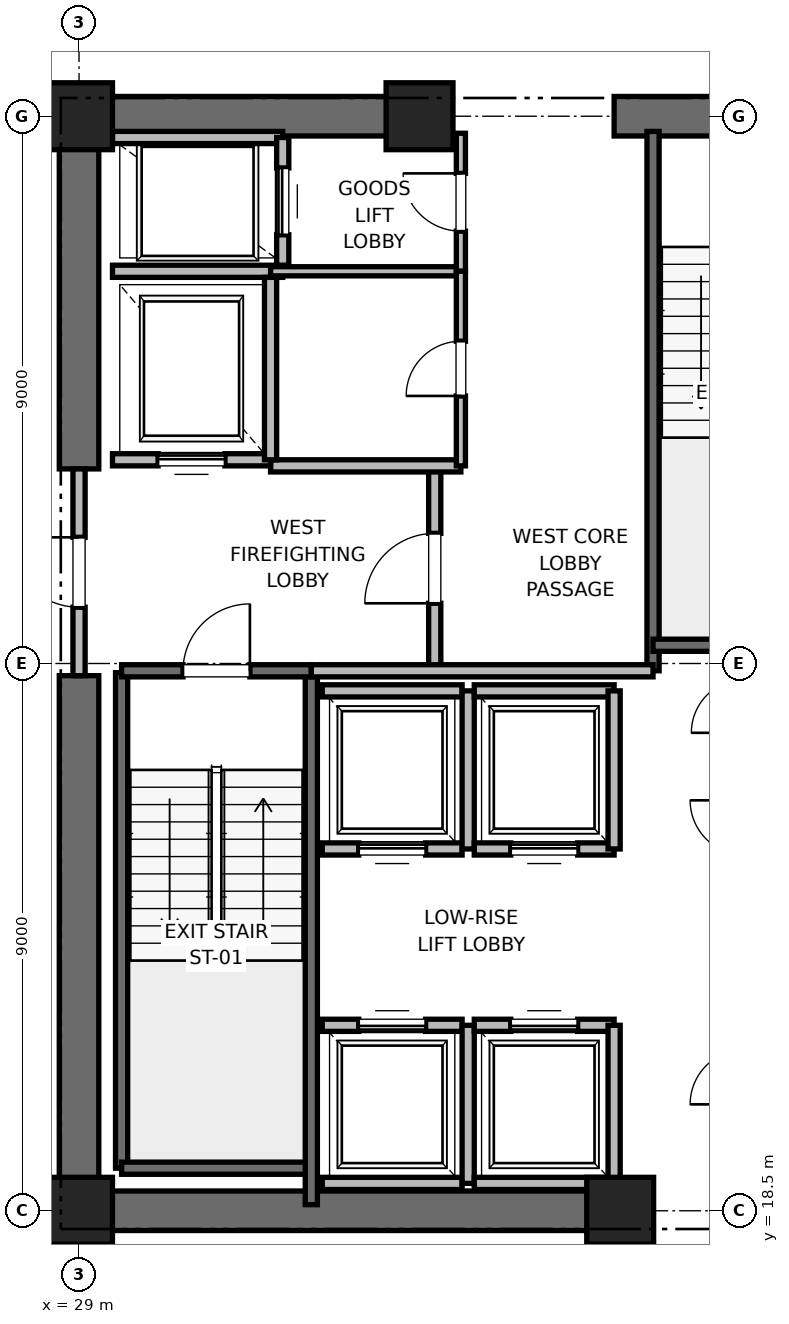
"""IFC4 building model, lengths in metres.
Left out: names, types, materials, properties, quantities, classifications, styles, units other than length and angle.
Written with IfcOpenShell. Run it as: python <this file> out.ifc"""

import sys

from ifc_helpers import new_model, si_unit, direction, frame, frame_2d, origin, origin_2d, place, context, subcontext, project, spatial, rectangle, extrude, element, fill, save


model = new_model("IFC4")
c1 = context("Model", 3, precision=1e-05, world=origin(), true_north=direction((0.0, 1.0)))
c2 = subcontext(c1, "Body", "Model", "MODEL_VIEW")
j1 = project(units=[si_unit("LENGTHUNIT", "METRE"), si_unit("PLANEANGLEUNIT", "RADIAN")], contexts=[c1])
p1 = place(None, origin())
s1 = spatial("IfcSite", under=j1, at=p1, CompositionType="ELEMENT")
p2 = place(p1, origin())
s2 = spatial("IfcBuilding", under=s1, at=p2, CompositionType="ELEMENT")
p3 = place(p2, frame((0.0, 0.0, 71.6)))
s3 = spatial("IfcBuildingStorey", under=s2, at=p3, CompositionType="ELEMENT", Elevation=71.6)
for number, where, z_axis, x_axis in (
    (1, (29.0, 18.5, 0.0), (0.0, 0.0, 1.0), (1.0, 0.0, 0.0)),
    (2, (29.0, 36.5, 0.0), (0.0, 0.0, 1.0), (1.0, 0.0, 0.0)),
    (3, (37.9, 18.5, 0.0), (0.0, 0.0, 1.0), (1.0, 0.0, 0.0)),
    (4, (34.6, 36.5, 0.0), (0.0, 0.0, 1.0), (1.0, 0.0, 0.0)),
):
    element("IfcColumn", number, at=place(p3, frame(where, z_axis=z_axis, x_axis=x_axis)), inside=s3, PredefinedType="PILASTER", context=c2, shape_type="SweptSolid", body=[
        extrude(rectangle(XDim=1.1, YDim=1.1, at=origin_2d()), origin(), (0.0, 0.0, 1.0), 4.0),
    ])
p4 = place(p3, frame((29.0, 18.5, 0.0), z_axis=(0.0, 0.0, 1.0), x_axis=(1.0, 0.0, 0.0)))
e5 = element("IfcWall", 5, at=p4, inside=s3, PredefinedType="SHEAR", context=c2, shape_type="SweptSolid", body=[
    extrude(rectangle(XDim=9.2, YDim=0.65, at=frame_2d((4.6, 0.0))), origin(), (0.0, 0.0, 1.0), 3.76),
])
p5 = place(p3, frame((29.0, 36.5, 0.0), z_axis=(0.0, 0.0, 1.0), x_axis=(1.0, 0.0, 0.0)))
e6 = element("IfcWall", 6, at=p5, inside=s3, PredefinedType="SHEAR", context=c2, shape_type="SweptSolid", body=[
    extrude(rectangle(XDim=5.8, YDim=0.65, at=frame_2d((2.9, 0.0))), origin(), (0.0, 0.0, 1.0), 3.76),
])
p6 = place(p3, frame((37.8, 36.5, 0.0), z_axis=(0.0, 0.0, 1.0), x_axis=(1.0, 0.0, 0.0)))
e7 = element("IfcWall", 7, at=p6, inside=s3, PredefinedType="SHEAR", context=c2, shape_type="SweptSolid", body=[
    extrude(rectangle(XDim=4.4, YDim=0.65, at=frame_2d((2.2, 0.0))), origin(), (0.0, 0.0, 1.0), 3.76),
])
p7 = place(p6, frame((1.65, 0.0, 0.0)))
e8 = element("IfcOpeningElement", 8, at=p7, cuts=e7, PredefinedType="OPENING", context=c2, shape_type="SweptSolid", body=[
    extrude(rectangle(XDim=1.1, YDim=2.15, at=frame_2d((0.55, 1.075))), frame((0.0, 0.325, 0.0), z_axis=(0.0, -1.0, 0.0), x_axis=(1.0, 0.0, 0.0)), (0.0, 0.0, 1.0), 0.65),
])
p8 = place(p3, frame((29.0, 18.5, 0.0), z_axis=(0.0, 0.0, 1.0), x_axis=(0.0, 1.0, 0.0)))
e9 = element("IfcWall", 9, at=p8, inside=s3, PredefinedType="SHEAR", context=c2, shape_type="SweptSolid", body=[
    extrude(rectangle(XDim=8.8, YDim=0.65, at=frame_2d((4.4, 0.0))), origin(), (0.0, 0.0, 1.0), 3.76),
])
p9 = place(p3, frame((29.0, 30.7, 0.0), z_axis=(0.0, 0.0, 1.0), x_axis=(0.0, 1.0, 0.0)))
e10 = element("IfcWall", 10, at=p9, inside=s3, PredefinedType="SHEAR", context=c2, shape_type="SweptSolid", body=[
    extrude(rectangle(XDim=5.8, YDim=0.65, at=frame_2d((2.9, 0.0))), origin(), (0.0, 0.0, 1.0), 3.76),
])
p10 = place(p3, frame((29.7, 19.2, 0.0), z_axis=(0.0, 0.0, 1.0), x_axis=(0.0, 1.0, 0.0)))
e11 = element("IfcWall", 11, at=p10, inside=s3, PredefinedType="SOLIDWALL", context=c2, shape_type="SweptSolid", body=[
    extrude(rectangle(XDim=8.15, YDim=0.2, at=frame_2d((4.075, 0.0))), origin(), (0.0, 0.0, 1.0), 3.76),
])
p11 = place(p3, frame((29.7, 19.2, 0.0), z_axis=(0.0, 0.0, 1.0), x_axis=(1.0, 0.0, 0.0)))
e12 = element("IfcWall", 12, at=p11, inside=s3, PredefinedType="SOLIDWALL", context=c2, shape_type="SweptSolid", body=[
    extrude(rectangle(XDim=3.12, YDim=0.2, at=frame_2d((1.56, 0.0))), origin(), (0.0, 0.0, 1.0), 3.76),
])
p12 = place(p3, frame((32.82, 18.6, 0.0), z_axis=(0.0, 0.0, 1.0), x_axis=(0.0, 1.0, 0.0)))
e13 = element("IfcWall", 13, at=p12, inside=s3, PredefinedType="SOLIDWALL", context=c2, shape_type="SweptSolid", body=[
    extrude(rectangle(XDim=8.78, YDim=0.2, at=frame_2d((4.39, 0.0))), origin(), (0.0, 0.0, 1.0), 3.76),
])
p13 = place(p3, frame((29.7, 27.38, 0.0), z_axis=(0.0, 0.0, 1.0), x_axis=(1.0, 0.0, 0.0)))
e14 = element("IfcWall", 14, at=p13, inside=s3, PredefinedType="SOLIDWALL", context=c2, shape_type="SweptSolid", body=[
    extrude(rectangle(XDim=3.12, YDim=0.2, at=frame_2d((1.56, 0.0))), origin(), (0.0, 0.0, 1.0), 3.76),
])
p14 = place(p13, frame((1.01, 0.0, 0.0)))
e15 = element("IfcOpeningElement", 15, at=p14, cuts=e14, PredefinedType="OPENING", context=c2, shape_type="SweptSolid", body=[
    extrude(rectangle(XDim=1.1, YDim=2.15, at=frame_2d((0.55, 1.075))), frame((0.0, 0.1, 0.0), z_axis=(0.0, -1.0, 0.0), x_axis=(1.0, 0.0, 0.0)), (0.0, 0.0, 1.0), 0.2),
])
p15 = place(p3, frame((38.44, 27.38, 0.0), z_axis=(0.0, 0.0, 1.0), x_axis=(0.0, 1.0, 0.0)))
e16 = element("IfcWall", 16, at=p15, inside=s3, PredefinedType="SOLIDWALL", context=c2, shape_type="SweptSolid", body=[
    extrude(rectangle(XDim=8.87, YDim=0.2, at=frame_2d((4.435, 0.0))), origin(), (0.0, 0.0, 1.0), 3.76),
])
p16 = place(p3, frame((38.44, 27.8, 0.0), z_axis=(0.0, 0.0, 1.0), x_axis=(1.0, 0.0, 0.0)))
e17 = element("IfcWall", 17, at=p16, inside=s3, PredefinedType="SOLIDWALL", context=c2, shape_type="SweptSolid", body=[
    extrude(rectangle(XDim=3.32, YDim=0.2, at=frame_2d((1.66, 0.0))), origin(), (0.0, 0.0, 1.0), 3.76),
])
p17 = place(p3, frame((34.85, 27.38, 0.0), z_axis=(0.0, 0.0, 1.0), x_axis=(0.0, 1.0, 0.0)))
e18 = element("IfcWall", 18, at=p17, inside=s3, PredefinedType="PARTITIONING", context=c2, shape_type="SweptSolid", body=[
    extrude(rectangle(XDim=3.37, YDim=0.2, at=frame_2d((1.685, 0.0))), origin(), (0.0, 0.0, 1.0), 3.76),
])
p18 = place(p17, frame((1.11, 0.0, 0.0)))
e19 = element("IfcOpeningElement", 19, at=p18, cuts=e18, PredefinedType="OPENING", context=c2, shape_type="SweptSolid", body=[
    extrude(rectangle(XDim=1.15, YDim=2.2, at=frame_2d((0.575, 1.1))), frame((0.0, 0.1, 0.0), z_axis=(0.0, -1.0, 0.0), x_axis=(1.0, 0.0, 0.0)), (0.0, 0.0, 1.0), 0.2),
])
p19 = place(p3, frame((29.0, 27.3, 0.0), z_axis=(0.0, 0.0, 1.0), x_axis=(0.0, 1.0, 0.0)))
e20 = element("IfcWall", 20, at=p19, inside=s3, PredefinedType="PARTITIONING", context=c2, shape_type="SweptSolid", body=[
    extrude(rectangle(XDim=3.4, YDim=0.2, at=frame_2d((1.7, 0.0))), origin(), (0.0, 0.0, 1.0), 2.54),
])
p20 = place(p19, frame((1.125, 0.0, 0.0)))
e21 = element("IfcOpeningElement", 21, at=p20, cuts=e20, PredefinedType="OPENING", context=c2, shape_type="SweptSolid", body=[
    extrude(rectangle(XDim=1.15, YDim=2.2, at=frame_2d((0.575, 1.1))), frame((0.0, 0.1, 0.0), z_axis=(0.0, -1.0, 0.0), x_axis=(1.0, 0.0, 0.0)), (0.0, 0.0, 1.0), 0.2),
])
p21 = place(p3, frame((32.82, 27.38, 0.0), z_axis=(0.0, 0.0, 1.0), x_axis=(1.0, 0.0, 0.0)))
e22 = element("IfcWall", 22, at=p21, inside=s3, PredefinedType="PARTITIONING", context=c2, shape_type="SweptSolid", body=[
    extrude(rectangle(XDim=5.62, YDim=0.2, at=frame_2d((2.81, 0.0))), origin(), (0.0, 0.0, 1.0), 3.76),
])
p22 = place(p3, frame((32.15, 30.75, 0.0), z_axis=(0.0, 0.0, 1.0), x_axis=(1.0, 0.0, 0.0)))
e23 = element("IfcWall", 23, at=p22, inside=s3, PredefinedType="PARTITIONING", context=c2, shape_type="SweptSolid", body=[
    extrude(rectangle(XDim=3.13, YDim=0.2, at=frame_2d((1.565, 0.0))), origin(), (0.0, 0.0, 1.0), 3.76),
])
p23 = place(p3, frame((29.55, 30.85, 0.0), z_axis=(0.0, 0.0, 1.0), x_axis=(1.0, 0.0, 0.0)))
e24 = element("IfcWall", 24, at=p23, inside=s3, PredefinedType="SOLIDWALL", context=c2, shape_type="SweptSolid", body=[
    extrude(rectangle(XDim=2.6, YDim=0.2, at=frame_2d((1.3, 0.0))), origin(), (0.0, 0.0, 1.0), 2.54),
])
p24 = place(p23, frame((0.75, 0.0, 0.0)))
e25 = element("IfcOpeningElement", 25, at=p24, cuts=e24, PredefinedType="OPENING", context=c2, shape_type="SweptSolid", body=[
    extrude(rectangle(XDim=1.1, YDim=2.2, at=frame_2d((0.55, 1.1))), frame((0.0, 0.1, 0.0), z_axis=(0.0, -1.0, 0.0), x_axis=(1.0, 0.0, 0.0)), (0.0, 0.0, 1.0), 0.2),
])
p25 = place(p3, frame((29.55, 33.95, 0.0), z_axis=(0.0, 0.0, 1.0), x_axis=(1.0, 0.0, 0.0)))
e26 = element("IfcWall", 26, at=p25, inside=s3, PredefinedType="SOLIDWALL", context=c2, shape_type="SweptSolid", body=[
    extrude(rectangle(XDim=2.8, YDim=0.2, at=frame_2d((1.4, 0.0))), origin(), (0.0, 0.0, 1.0), 3.76),
])
p26 = place(p3, frame((32.15, 30.85, 0.0), z_axis=(0.0, 0.0, 1.0), x_axis=(0.0, 1.0, 0.0)))
e27 = element("IfcWall", 27, at=p26, inside=s3, PredefinedType="SOLIDWALL", context=c2, shape_type="SweptSolid", body=[
    extrude(rectangle(XDim=3.0, YDim=0.2, at=frame_2d((1.5, 0.0))), origin(), (0.0, 0.0, 1.0), 3.76),
])
p27 = place(p3, frame((32.35, 36.15, 0.0), z_axis=(0.0, 0.0, 1.0), x_axis=(-1.0, 0.0, 0.0)))
e28 = element("IfcWall", 28, at=p27, inside=s3, PredefinedType="SOLIDWALL", context=c2, shape_type="SweptSolid", body=[
    extrude(rectangle(XDim=2.8, YDim=0.2, at=frame_2d((1.4, 0.0))), origin(), (0.0, 0.0, 1.0), 2.889),
])
p28 = place(p3, frame((32.35, 34.05, 0.0), z_axis=(0.0, 0.0, 1.0), x_axis=(0.0, 1.0, 0.0)))
e29 = element("IfcWall", 29, at=p28, inside=s3, PredefinedType="SOLIDWALL", context=c2, shape_type="SweptSolid", body=[
    extrude(rectangle(XDim=2.1, YDim=0.2, at=frame_2d((1.05, 0.0))), origin(), (0.0, 0.0, 1.0), 3.76),
])
p29 = place(p28, frame((0.5, 0.0, 0.0)))
e30 = element("IfcOpeningElement", 30, at=p29, cuts=e29, PredefinedType="OPENING", context=c2, shape_type="SweptSolid", body=[
    extrude(rectangle(XDim=1.1, YDim=2.2, at=frame_2d((0.55, 1.1))), frame((0.0, 0.1, 0.0), z_axis=(0.0, -1.0, 0.0), x_axis=(1.0, 0.0, 0.0)), (0.0, 0.0, 1.0), 0.2),
])
p30 = place(p3, frame((33.0, 18.95, 0.0), z_axis=(0.0, 0.0, 1.0), x_axis=(1.0, 0.0, 0.0)))
e31 = element("IfcWall", 31, at=p30, inside=s3, PredefinedType="SOLIDWALL", context=c2, shape_type="SweptSolid", body=[
    extrude(rectangle(XDim=2.3, YDim=0.2, at=frame_2d((1.15, 0.0))), origin(), (0.0, 0.0, 1.0), 3.76),
])
p31 = place(p3, frame((35.3, 21.55, 0.0), z_axis=(0.0, 0.0, 1.0), x_axis=(-1.0, 0.0, 0.0)))
e32 = element("IfcWall", 32, at=p31, inside=s3, PredefinedType="SOLIDWALL", context=c2, shape_type="SweptSolid", body=[
    extrude(rectangle(XDim=2.3, YDim=0.2, at=frame_2d((1.15, 0.0))), origin(), (0.0, 0.0, 1.0), 3.76),
])
p32 = place(p31, frame((0.6, 0.0, 0.0)))
e33 = element("IfcOpeningElement", 33, at=p32, cuts=e32, PredefinedType="OPENING", context=c2, shape_type="SweptSolid", body=[
    extrude(rectangle(XDim=1.1, YDim=2.2, at=frame_2d((0.55, 1.1))), frame((0.0, 0.1, 0.0), z_axis=(0.0, -1.0, 0.0), x_axis=(1.0, 0.0, 0.0)), (0.0, 0.0, 1.0), 0.2),
])
p33 = place(p3, frame((35.4, 18.95, 0.0), z_axis=(0.0, 0.0, 1.0), x_axis=(0.0, 1.0, 0.0)))
e34 = element("IfcWall", 34, at=p33, inside=s3, PredefinedType="SOLIDWALL", context=c2, shape_type="SweptSolid", body=[
    extrude(rectangle(XDim=2.6, YDim=0.2, at=frame_2d((1.3, 0.0))), origin(), (0.0, 0.0, 1.0), 3.76),
])
p34 = place(p3, frame((35.5, 18.95, 0.0), z_axis=(0.0, 0.0, 1.0), x_axis=(1.0, 0.0, 0.0)))
e35 = element("IfcWall", 35, at=p34, inside=s3, PredefinedType="SOLIDWALL", context=c2, shape_type="SweptSolid", body=[
    extrude(rectangle(XDim=2.3, YDim=0.2, at=frame_2d((1.15, 0.0))), origin(), (0.0, 0.0, 1.0), 2.54),
])
p35 = place(p3, frame((37.8, 21.55, 0.0), z_axis=(0.0, 0.0, 1.0), x_axis=(-1.0, 0.0, 0.0)))
e36 = element("IfcWall", 36, at=p35, inside=s3, PredefinedType="SOLIDWALL", context=c2, shape_type="SweptSolid", body=[
    extrude(rectangle(XDim=2.3, YDim=0.2, at=frame_2d((1.15, 0.0))), origin(), (0.0, 0.0, 1.0), 3.76),
])
p36 = place(p35, frame((0.6, 0.0, 0.0)))
e37 = element("IfcOpeningElement", 37, at=p36, cuts=e36, PredefinedType="OPENING", context=c2, shape_type="SweptSolid", body=[
    extrude(rectangle(XDim=1.1, YDim=2.2, at=frame_2d((0.55, 1.1))), frame((0.0, 0.1, 0.0), z_axis=(0.0, -1.0, 0.0), x_axis=(1.0, 0.0, 0.0)), (0.0, 0.0, 1.0), 0.2),
])
p37 = place(p3, frame((37.8, 18.95, 0.0), z_axis=(0.0, 0.0, 1.0), x_axis=(0.0, 1.0, 0.0)))
e38 = element("IfcWall", 38, at=p37, inside=s3, PredefinedType="SOLIDWALL", context=c2, shape_type="SweptSolid", body=[
    extrude(rectangle(XDim=2.6, YDim=0.2, at=frame_2d((1.3, 0.0))), origin(), (0.0, 0.0, 1.0), 2.54),
])
p38 = place(p3, frame((33.0, 24.45, 0.0), z_axis=(0.0, 0.0, 1.0), x_axis=(1.0, 0.0, 0.0)))
e39 = element("IfcWall", 39, at=p38, inside=s3, PredefinedType="SOLIDWALL", context=c2, shape_type="SweptSolid", body=[
    extrude(rectangle(XDim=2.3, YDim=0.2, at=frame_2d((1.15, 0.0))), origin(), (0.0, 0.0, 1.0), 3.76),
])
p39 = place(p38, frame((0.6, 0.0, 0.0)))
e40 = element("IfcOpeningElement", 40, at=p39, cuts=e39, PredefinedType="OPENING", context=c2, shape_type="SweptSolid", body=[
    extrude(rectangle(XDim=1.1, YDim=2.2, at=frame_2d((0.55, 1.1))), frame((0.0, 0.1, 0.0), z_axis=(0.0, -1.0, 0.0), x_axis=(1.0, 0.0, 0.0)), (0.0, 0.0, 1.0), 0.2),
])
p40 = place(p3, frame((35.3, 27.05, 0.0), z_axis=(0.0, 0.0, 1.0), x_axis=(-1.0, 0.0, 0.0)))
e41 = element("IfcWall", 41, at=p40, inside=s3, PredefinedType="SOLIDWALL", context=c2, shape_type="SweptSolid", body=[
    extrude(rectangle(XDim=2.3, YDim=0.2, at=frame_2d((1.15, 0.0))), origin(), (0.0, 0.0, 1.0), 3.76),
])
p41 = place(p3, frame((35.4, 24.45, 0.0), z_axis=(0.0, 0.0, 1.0), x_axis=(0.0, 1.0, 0.0)))
e42 = element("IfcWall", 42, at=p41, inside=s3, PredefinedType="SOLIDWALL", context=c2, shape_type="SweptSolid", body=[
    extrude(rectangle(XDim=2.6, YDim=0.2, at=frame_2d((1.3, 0.0))), origin(), (0.0, 0.0, 1.0), 3.76),
])
p42 = place(p3, frame((35.5, 24.45, 0.0), z_axis=(0.0, 0.0, 1.0), x_axis=(1.0, 0.0, 0.0)))
e43 = element("IfcWall", 43, at=p42, inside=s3, PredefinedType="SOLIDWALL", context=c2, shape_type="SweptSolid", body=[
    extrude(rectangle(XDim=2.3, YDim=0.2, at=frame_2d((1.15, 0.0))), origin(), (0.0, 0.0, 1.0), 3.76),
])
p43 = place(p42, frame((0.6, 0.0, 0.0)))
e44 = element("IfcOpeningElement", 44, at=p43, cuts=e43, PredefinedType="OPENING", context=c2, shape_type="SweptSolid", body=[
    extrude(rectangle(XDim=1.1, YDim=2.2, at=frame_2d((0.55, 1.1))), frame((0.0, 0.1, 0.0), z_axis=(0.0, -1.0, 0.0), x_axis=(1.0, 0.0, 0.0)), (0.0, 0.0, 1.0), 0.2),
])
p44 = place(p3, frame((37.8, 27.05, 0.0), z_axis=(0.0, 0.0, 1.0), x_axis=(-1.0, 0.0, 0.0)))
e45 = element("IfcWall", 45, at=p44, inside=s3, PredefinedType="SOLIDWALL", context=c2, shape_type="SweptSolid", body=[
    extrude(rectangle(XDim=2.3, YDim=0.2, at=frame_2d((1.15, 0.0))), origin(), (0.0, 0.0, 1.0), 3.76),
])
p45 = place(p3, frame((37.8, 24.45, 0.0), z_axis=(0.0, 0.0, 1.0), x_axis=(0.0, 1.0, 0.0)))
e46 = element("IfcWall", 46, at=p45, inside=s3, PredefinedType="SOLIDWALL", context=c2, shape_type="SweptSolid", body=[
    extrude(rectangle(XDim=2.6, YDim=0.2, at=frame_2d((1.3, 0.0))), origin(), (0.0, 0.0, 1.0), 3.76),
])
p46 = place(p3, frame((32.15, 33.95, 0.0), z_axis=(0.0, 0.0, 1.0), x_axis=(1.0, 0.0, 0.0)))
e47 = element("IfcWall", 47, at=p46, inside=s3, PredefinedType="PARTITIONING", context=c2, shape_type="SweptSolid", body=[
    extrude(rectangle(XDim=3.13, YDim=0.15, at=frame_2d((1.565, 0.0))), origin(), (0.0, 0.0, 1.0), 2.85),
])
p47 = place(p3, frame((35.28, 33.95, 0.0), z_axis=(0.0, 0.0, 1.0), x_axis=(0.0, 1.0, 0.0)))
e48 = element("IfcWall", 48, at=p47, inside=s3, PredefinedType="PARTITIONING", context=c2, shape_type="SweptSolid", body=[
    extrude(rectangle(XDim=2.27, YDim=0.15, at=frame_2d((1.135, 0.0))), origin(), (0.0, 0.0, 1.0), 2.54),
])
p48 = place(p47, frame((0.66, 0.0, 0.0)))
e49 = element("IfcOpeningElement", 49, at=p48, cuts=e48, PredefinedType="OPENING", context=c2, shape_type="SweptSolid", body=[
    extrude(rectangle(XDim=0.95, YDim=2.15, at=frame_2d((0.475, 1.075))), frame((0.0, 0.075, 0.0), z_axis=(0.0, -1.0, 0.0), x_axis=(1.0, 0.0, 0.0)), (0.0, 0.0, 1.0), 0.15),
])
p49 = place(p3, frame((35.28, 30.75, 0.0), z_axis=(0.0, 0.0, 1.0), x_axis=(0.0, 1.0, 0.0)))
e50 = element("IfcWall", 50, at=p49, inside=s3, PredefinedType="PARTITIONING", context=c2, shape_type="SweptSolid", body=[
    extrude(rectangle(XDim=3.2, YDim=0.15, at=frame_2d((1.6, 0.0))), origin(), (0.0, 0.0, 1.0), 2.85),
])
p50 = place(p49, frame((1.15, 0.0, 0.0)))
e51 = element("IfcOpeningElement", 51, at=p50, cuts=e50, PredefinedType="OPENING", context=c2, shape_type="SweptSolid", body=[
    extrude(rectangle(XDim=0.9, YDim=2.1, at=frame_2d((0.45, 1.05))), frame((0.0, 0.075, 0.0), z_axis=(0.0, -1.0, 0.0), x_axis=(1.0, 0.0, 0.0)), (0.0, 0.0, 1.0), 0.15),
])
p51 = place(p14, origin())
e52 = element("IfcDoor", 52, at=p51, inside=s3, OperationType="SINGLE_SWING_RIGHT", PredefinedType="DOOR", context=c2, shape_type="SweptSolid", body=[
    extrude(rectangle(XDim=1.1, YDim=2.15, at=frame_2d((0.55, 1.075))), frame((0.0, 0.025, 0.0), z_axis=(0.0, -1.0, 0.0), x_axis=(1.0, 0.0, 0.0)), (0.0, 0.0, 1.0), 0.05),
])
fill(e15, e52)
p52 = place(p18, origin())
e53 = element("IfcDoor", 53, at=p52, inside=s3, OperationType="SINGLE_SWING_LEFT", PredefinedType="DOOR", context=c2, shape_type="SweptSolid", body=[
    extrude(rectangle(XDim=1.15, YDim=2.2, at=frame_2d((0.575, 1.1))), frame((0.0, 0.025, 0.0), z_axis=(0.0, -1.0, 0.0), x_axis=(1.0, 0.0, 0.0)), (0.0, 0.0, 1.0), 0.05),
])
fill(e19, e53)
p53 = place(p20, origin())
e54 = element("IfcDoor", 54, at=p53, inside=s3, OperationType="SINGLE_SWING_RIGHT", PredefinedType="DOOR", context=c2, shape_type="SweptSolid", body=[
    extrude(rectangle(XDim=1.15, YDim=2.2, at=frame_2d((0.575, 1.1))), frame((0.0, 0.025, 0.0), z_axis=(0.0, -1.0, 0.0), x_axis=(1.0, 0.0, 0.0)), (0.0, 0.0, 1.0), 0.05),
])
fill(e21, e54)
p54 = place(p24, origin())
e55 = element("IfcDoor", 55, at=p54, inside=s3, OperationType="SLIDING_TO_RIGHT", PredefinedType="DOOR", context=c2, shape_type="SweptSolid", body=[
    extrude(rectangle(XDim=1.1, YDim=2.2, at=frame_2d((0.55, 1.1))), frame((0.0, 0.025, 0.0), z_axis=(0.0, -1.0, 0.0), x_axis=(1.0, 0.0, 0.0)), (0.0, 0.0, 1.0), 0.05),
])
fill(e25, e55)
p55 = place(p29, origin())
e56 = element("IfcDoor", 56, at=p55, inside=s3, OperationType="SLIDING_TO_RIGHT", PredefinedType="DOOR", context=c2, shape_type="SweptSolid", body=[
    extrude(rectangle(XDim=1.1, YDim=2.2, at=frame_2d((0.55, 1.1))), frame((0.0, 0.025, 0.0), z_axis=(0.0, -1.0, 0.0), x_axis=(1.0, 0.0, 0.0)), (0.0, 0.0, 1.0), 0.05),
])
fill(e30, e56)
p56 = place(p32, origin())
e57 = element("IfcDoor", 57, at=p56, inside=s3, OperationType="SLIDING_TO_RIGHT", PredefinedType="DOOR", context=c2, shape_type="SweptSolid", body=[
    extrude(rectangle(XDim=1.1, YDim=2.2, at=frame_2d((0.55, 1.1))), frame((0.0, 0.025, 0.0), z_axis=(0.0, -1.0, 0.0), x_axis=(1.0, 0.0, 0.0)), (0.0, 0.0, 1.0), 0.05),
])
fill(e33, e57)
p57 = place(p36, origin())
e58 = element("IfcDoor", 58, at=p57, inside=s3, OperationType="SLIDING_TO_RIGHT", PredefinedType="DOOR", context=c2, shape_type="SweptSolid", body=[
    extrude(rectangle(XDim=1.1, YDim=2.2, at=frame_2d((0.55, 1.1))), frame((0.0, 0.025, 0.0), z_axis=(0.0, -1.0, 0.0), x_axis=(1.0, 0.0, 0.0)), (0.0, 0.0, 1.0), 0.05),
])
fill(e37, e58)
p58 = place(p39, origin())
e59 = element("IfcDoor", 59, at=p58, inside=s3, OperationType="SLIDING_TO_RIGHT", PredefinedType="DOOR", context=c2, shape_type="SweptSolid", body=[
    extrude(rectangle(XDim=1.1, YDim=2.2, at=frame_2d((0.55, 1.1))), frame((0.0, 0.025, 0.0), z_axis=(0.0, -1.0, 0.0), x_axis=(1.0, 0.0, 0.0)), (0.0, 0.0, 1.0), 0.05),
])
fill(e40, e59)
p59 = place(p43, origin())
e60 = element("IfcDoor", 60, at=p59, inside=s3, OperationType="SLIDING_TO_RIGHT", PredefinedType="DOOR", context=c2, shape_type="SweptSolid", body=[
    extrude(rectangle(XDim=1.1, YDim=2.2, at=frame_2d((0.55, 1.1))), frame((0.0, 0.025, 0.0), z_axis=(0.0, -1.0, 0.0), x_axis=(1.0, 0.0, 0.0)), (0.0, 0.0, 1.0), 0.05),
])
fill(e44, e60)
p60 = place(p48, origin())
e61 = element("IfcDoor", 61, at=p60, inside=s3, OperationType="SINGLE_SWING_RIGHT", PredefinedType="DOOR", context=c2, shape_type="SweptSolid", body=[
    extrude(rectangle(XDim=0.95, YDim=2.15, at=frame_2d((0.475, 1.075))), frame((0.0, 0.025, 0.0), z_axis=(0.0, -1.0, 0.0), x_axis=(1.0, 0.0, 0.0)), (0.0, 0.0, 1.0), 0.05),
])
fill(e49, e61)
p61 = place(p50, origin())
e62 = element("IfcDoor", 62, at=p61, inside=s3, OperationType="SINGLE_SWING_LEFT", PredefinedType="DOOR", context=c2, shape_type="SweptSolid", body=[
    extrude(rectangle(XDim=0.9, YDim=2.1, at=frame_2d((0.45, 1.05))), frame((0.0, 0.025, 0.0), z_axis=(0.0, -1.0, 0.0), x_axis=(1.0, 0.0, 0.0)), (0.0, 0.0, 1.0), 0.05),
])
fill(e51, e62)
save(model, sys.argv[1])
